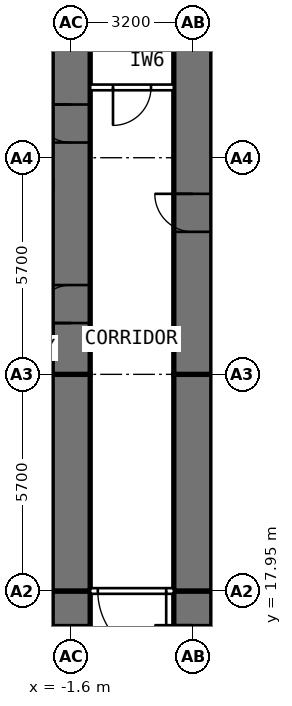
"""IFC4 building model, lengths in metres.
Left out: names, types, materials, properties, quantities, classifications, styles, units other than length and angle.
Written with IfcOpenShell. Run it as: python <this file> out.ifc"""

import sys

from ifc_helpers import new_model, si_unit, direction, frame, frame_2d, origin, place, context, subcontext, project, spatial, rectangle, extrude, element, fill, save


model = new_model("IFC4")
c1 = context("Model", 3, precision=1e-05, world=origin(), true_north=direction((0.0, 1.0)))
c2 = subcontext(c1, "Body", "Model", "MODEL_VIEW")
j1 = project(units=[si_unit("LENGTHUNIT", "METRE"), si_unit("PLANEANGLEUNIT", "RADIAN")], contexts=[c1])
p1 = place(None, origin())
s1 = spatial("IfcSite", under=j1, at=p1, CompositionType="ELEMENT")
p2 = place(p1, origin())
s2 = spatial("IfcBuilding", under=s1, at=p2, CompositionType="ELEMENT")
p3 = place(p2, frame((0.0, 0.0, 53.8)))
s3 = spatial("IfcBuildingStorey", under=s2, at=p3, CompositionType="ELEMENT", Elevation=53.8)
p4 = place(p3, frame((-1.6, 9.6, 0.0), z_axis=(0.0, 0.0, 1.0), x_axis=(0.0, 1.0, 0.0)))
e1 = element("IfcWall", 1, at=p4, inside=s3, PredefinedType="SHEAR", context=c2, shape_type="SweptSolid", body=[
    extrude(rectangle(XDim=8.35, YDim=1.0, at=frame_2d((4.175, 0.0))), origin(), (0.0, 0.0, 1.0), 3.6),
])
p5 = place(p4, frame((6.45, 0.0, 0.0)))
e2 = element("IfcOpeningElement", 2, at=p5, cuts=e1, PredefinedType="OPENING", context=c2, shape_type="SweptSolid", body=[
    extrude(rectangle(XDim=1.0, YDim=2.1, at=frame_2d((0.5, 1.05))), frame((0.0, 0.512, 0.0), z_axis=(0.0, -1.0, 0.0), x_axis=(1.0, 0.0, 0.0)), (0.0, 0.0, 1.0), 1.024),
])
p6 = place(p3, frame((-1.6, 17.95, 0.0), z_axis=(0.0, 0.0, 1.0), x_axis=(0.0, 1.0, 0.0)))
e3 = element("IfcWall", 3, at=p6, inside=s3, PredefinedType="SHEAR", context=c2, shape_type="SweptSolid", body=[
    extrude(rectangle(XDim=5.7, YDim=1.0, at=frame_2d((2.85, 0.0))), origin(), (0.0, 0.0, 1.0), 3.6),
])
p7 = place(p3, frame((-1.6, 23.65, 0.0), z_axis=(0.0, 0.0, 1.0), x_axis=(0.0, 1.0, 0.0)))
e4 = element("IfcWall", 4, at=p7, inside=s3, PredefinedType="SHEAR", context=c2, shape_type="SweptSolid", body=[
    extrude(rectangle(XDim=10.745, YDim=1.0, at=frame_2d((5.373, 0.0))), origin(), (0.0, 0.0, 1.0), 3.6),
])
p8 = place(p7, frame((6.1, 0.0, 0.0)))
e5 = element("IfcOpeningElement", 5, at=p8, cuts=e4, PredefinedType="OPENING", context=c2, shape_type="SweptSolid", body=[
    extrude(rectangle(XDim=1.0, YDim=2.1, at=frame_2d((0.5, 1.05))), frame((0.0, 0.512, 0.0), z_axis=(0.0, -1.0, 0.0), x_axis=(1.0, 0.0, 0.0)), (0.0, 0.0, 1.0), 1.024),
])
p9 = place(p7, frame((1.35, 0.0, 0.0)))
e6 = element("IfcOpeningElement", 6, at=p9, cuts=e4, PredefinedType="OPENING", context=c2, shape_type="SweptSolid", body=[
    extrude(rectangle(XDim=1.0, YDim=2.1, at=frame_2d((0.5, 1.05))), frame((0.0, 0.512, 0.0), z_axis=(0.0, -1.0, 0.0), x_axis=(1.0, 0.0, 0.0)), (0.0, 0.0, 1.0), 1.024),
])
p10 = place(p3, frame((1.6, 9.6, 0.0), z_axis=(0.0, 0.0, 1.0), x_axis=(0.0, 1.0, 0.0)))
e7 = element("IfcWall", 7, at=p10, inside=s3, PredefinedType="SHEAR", context=c2, shape_type="SweptSolid", body=[
    extrude(rectangle(XDim=8.35, YDim=1.0, at=frame_2d((4.175, 0.0))), origin(), (0.0, 0.0, 1.0), 3.6),
])
p11 = place(p10, frame((6.45, 0.0, 0.0)))
e8 = element("IfcOpeningElement", 8, at=p11, cuts=e7, PredefinedType="OPENING", context=c2, shape_type="SweptSolid", body=[
    extrude(rectangle(XDim=1.0, YDim=2.1, at=frame_2d((0.5, 1.05))), frame((0.0, 0.512, 0.0), z_axis=(0.0, -1.0, 0.0), x_axis=(1.0, 0.0, 0.0)), (0.0, 0.0, 1.0), 1.024),
])
p12 = place(p3, frame((1.6, 17.95, 0.0), z_axis=(0.0, 0.0, 1.0), x_axis=(0.0, 1.0, 0.0)))
e9 = element("IfcWall", 9, at=p12, inside=s3, PredefinedType="SHEAR", context=c2, shape_type="SweptSolid", body=[
    extrude(rectangle(XDim=5.7, YDim=1.0, at=frame_2d((2.85, 0.0))), origin(), (0.0, 0.0, 1.0), 3.6),
])
p13 = place(p3, frame((1.6, 23.65, 0.0), z_axis=(0.0, 0.0, 1.0), x_axis=(0.0, 1.0, 0.0)))
e10 = element("IfcWall", 10, at=p13, inside=s3, PredefinedType="SHEAR", context=c2, shape_type="SweptSolid", body=[
    extrude(rectangle(XDim=10.745, YDim=1.0, at=frame_2d((5.373, 0.0))), origin(), (0.0, 0.0, 1.0), 3.6),
])
p14 = place(p13, frame((3.75, 0.0, 0.0)))
e11 = element("IfcOpeningElement", 11, at=p14, cuts=e10, PredefinedType="OPENING", context=c2, shape_type="SweptSolid", body=[
    extrude(rectangle(XDim=1.0, YDim=2.1, at=frame_2d((0.5, 1.05))), frame((0.0, 0.512, 0.0), z_axis=(0.0, -1.0, 0.0), x_axis=(1.0, 0.0, 0.0)), (0.0, 0.0, 1.0), 1.024),
])
p15 = place(p3, frame((2.1, 26.5, 0.0), z_axis=(0.0, 0.0, 1.0), x_axis=(1.0, 0.0, 0.0)))
e12 = element("IfcWall", 12, at=p15, inside=s3, PredefinedType="PARTITIONING", context=c2, shape_type="SweptSolid", body=[
    extrude(rectangle(XDim=8.6, YDim=0.2, at=frame_2d((4.3, 0.0))), origin(), (0.0, 0.0, 1.0), 3.35),
])
p16 = place(p3, frame((1.1, 31.2, 0.0), z_axis=(0.0, 0.0, 1.0), x_axis=(-1.0, 0.0, 0.0)))
e13 = element("IfcWall", 13, at=p16, inside=s3, PredefinedType="PARTITIONING", context=c2, shape_type="SweptSolid", body=[
    extrude(rectangle(XDim=2.2, YDim=0.15, at=frame_2d((1.1, 0.0))), origin(), (0.0, 0.0, 1.0), 3.35),
])
p17 = place(p16, frame((0.6, 0.0, 0.0)))
e14 = element("IfcOpeningElement", 14, at=p17, cuts=e13, PredefinedType="OPENING", context=c2, shape_type="SweptSolid", body=[
    extrude(rectangle(XDim=1.0, YDim=2.1, at=frame_2d((0.5, 1.05))), frame((0.0, 0.087, 0.0), z_axis=(0.0, -1.0, 0.0), x_axis=(1.0, 0.0, 0.0)), (0.0, 0.0, 1.0), 0.174),
])
p18 = place(p3, frame((1.1, 17.95, 0.0), z_axis=(0.0, 0.0, 1.0), x_axis=(-1.0, 0.0, 0.0)))
e15 = element("IfcWall", 15, at=p18, inside=s3, PredefinedType="PARTITIONING", context=c2, shape_type="SweptSolid", body=[
    extrude(rectangle(XDim=2.2, YDim=0.15, at=frame_2d((1.1, 0.0))), origin(), (0.0, 0.0, 1.0), 3.35),
])
p19 = place(p18, frame((0.2, 0.0, 0.0)))
e16 = element("IfcOpeningElement", 16, at=p19, cuts=e15, PredefinedType="OPENING", context=c2, shape_type="SweptSolid", body=[
    extrude(rectangle(XDim=1.8, YDim=2.1, at=frame_2d((0.9, 1.05))), frame((0.0, 0.087, 0.0), z_axis=(0.0, -1.0, 0.0), x_axis=(1.0, 0.0, 0.0)), (0.0, 0.0, 1.0), 0.174),
])
p20 = place(p5, origin())
e17 = element("IfcDoor", 17, at=p20, inside=s3, OperationType="SINGLE_SWING_LEFT", PredefinedType="DOOR", context=c2, shape_type="SweptSolid", body=[
    extrude(rectangle(XDim=1.0, YDim=2.1, at=frame_2d((0.5, 1.05))), frame((0.0, 0.25, 0.0), z_axis=(0.0, -1.0, 0.0), x_axis=(1.0, 0.0, 0.0)), (0.0, 0.0, 1.0), 0.5),
])
fill(e2, e17)
p21 = place(p8, origin())
e18 = element("IfcDoor", 18, at=p21, inside=s3, OperationType="SINGLE_SWING_RIGHT", PredefinedType="DOOR", context=c2, shape_type="SweptSolid", body=[
    extrude(rectangle(XDim=1.0, YDim=2.1, at=frame_2d((0.5, 1.05))), frame((0.0, 0.25, 0.0), z_axis=(0.0, -1.0, 0.0), x_axis=(1.0, 0.0, 0.0)), (0.0, 0.0, 1.0), 0.5),
])
fill(e5, e18)
p22 = place(p11, origin())
e19 = element("IfcDoor", 19, at=p22, inside=s3, OperationType="SINGLE_SWING_RIGHT", PredefinedType="DOOR", context=c2, shape_type="SweptSolid", body=[
    extrude(rectangle(XDim=1.0, YDim=2.1, at=frame_2d((0.5, 1.05))), frame((0.0, 0.25, 0.0), z_axis=(0.0, -1.0, 0.0), x_axis=(1.0, 0.0, 0.0)), (0.0, 0.0, 1.0), 0.5),
])
fill(e8, e19)
p23 = place(p14, origin())
e20 = element("IfcDoor", 20, at=p23, inside=s3, OperationType="SINGLE_SWING_RIGHT", PredefinedType="DOOR", context=c2, shape_type="SweptSolid", body=[
    extrude(rectangle(XDim=1.0, YDim=2.1, at=frame_2d((0.5, 1.05))), frame((0.0, 0.25, 0.0), z_axis=(0.0, -1.0, 0.0), x_axis=(1.0, 0.0, 0.0)), (0.0, 0.0, 1.0), 0.5),
])
fill(e11, e20)
p24 = place(p17, origin())
e21 = element("IfcDoor", 21, at=p24, inside=s3, OperationType="SINGLE_SWING_RIGHT", PredefinedType="DOOR", context=c2, shape_type="SweptSolid", body=[
    extrude(rectangle(XDim=1.0, YDim=2.1, at=frame_2d((0.5, 1.05))), frame((0.0, 0.025, 0.0), z_axis=(0.0, -1.0, 0.0), x_axis=(1.0, 0.0, 0.0)), (0.0, 0.0, 1.0), 0.05),
])
fill(e14, e21)
p25 = place(p19, origin())
e22 = element("IfcDoor", 22, at=p25, inside=s3, OperationType="DOUBLE_DOOR_DOUBLE_SWING", PredefinedType="DOOR", context=c2, shape_type="SweptSolid", body=[
    extrude(rectangle(XDim=1.8, YDim=2.1, at=frame_2d((0.9, 1.05))), frame((0.0, 0.025, 0.0), z_axis=(0.0, -1.0, 0.0), x_axis=(1.0, 0.0, 0.0)), (0.0, 0.0, 1.0), 0.05),
])
fill(e16, e22)
p26 = place(p9, origin())
e23 = element("IfcDoor", 23, at=p26, inside=s3, OperationType="SINGLE_SWING_LEFT", PredefinedType="DOOR", context=c2, shape_type="SweptSolid", body=[
    extrude(rectangle(XDim=1.0, YDim=2.1, at=frame_2d((0.5, 1.05))), frame((0.0, 0.25, 0.0), z_axis=(0.0, -1.0, 0.0), x_axis=(1.0, 0.0, 0.0)), (0.0, 0.0, 1.0), 0.5),
])
fill(e6, e23)
save(model, sys.argv[1])
